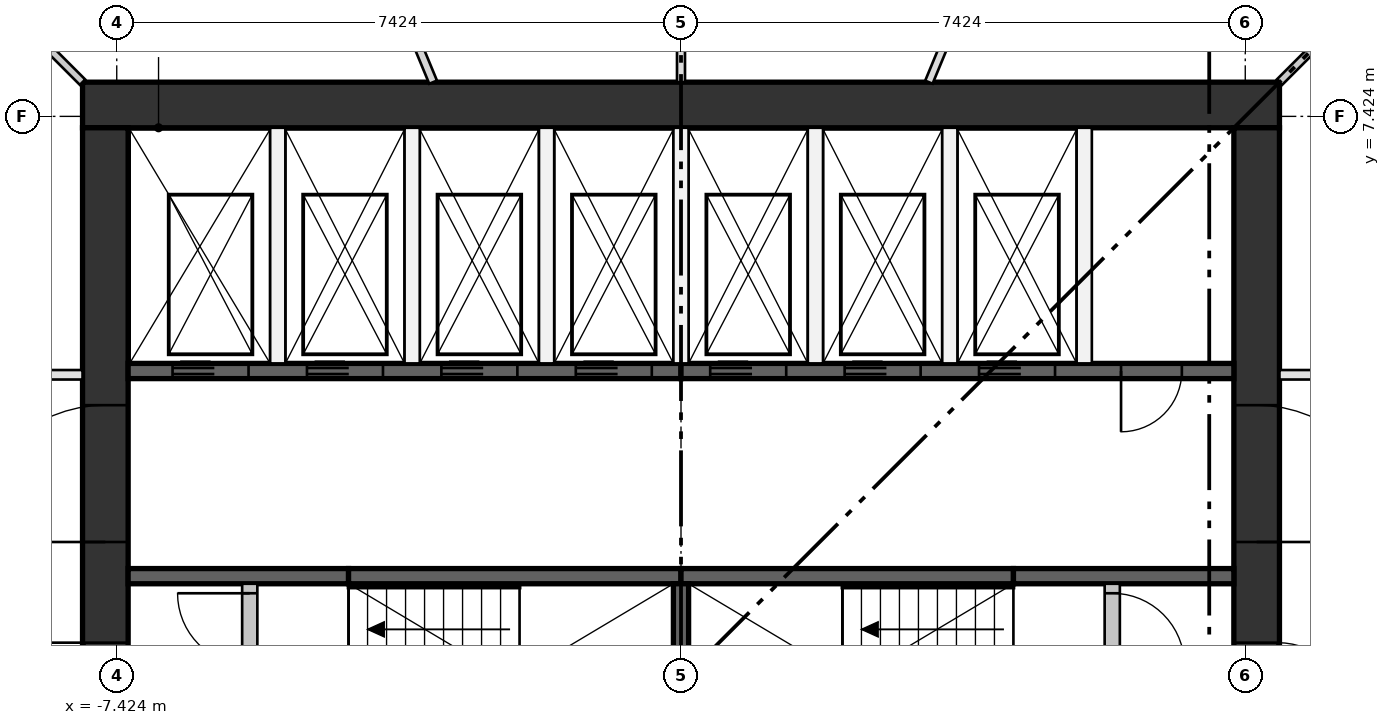
"""IFC4 building model, lengths in metres.
Left out: names, types, materials, properties, quantities, classifications, styles, units other than length and angle.
Written with IfcOpenShell. Run it as: python <this file> out.ifc"""

import sys

from ifc_helpers import new_model, si_unit, direction, frame, frame_2d, origin, place, context, subcontext, project, spatial, rectangle, extrude, element, fill, save


model = new_model("IFC4")
c1 = context("Model", 3, precision=1e-05, world=origin(), true_north=direction((0.0, 1.0)))
c2 = subcontext(c1, "Body", "Model", "MODEL_VIEW")
j1 = project(units=[si_unit("LENGTHUNIT", "METRE"), si_unit("PLANEANGLEUNIT", "RADIAN")], contexts=[c1])
p1 = place(None, origin())
s1 = spatial("IfcSite", under=j1, at=p1, CompositionType="ELEMENT")
p2 = place(p1, origin())
s2 = spatial("IfcBuilding", under=s1, at=p2, CompositionType="ELEMENT")
p3 = place(p2, frame((0.0, 0.0, 134.35)))
s3 = spatial("IfcBuildingStorey", under=s2, at=p3, CompositionType="ELEMENT", Elevation=134.35)
p4 = place(p3, frame((-7.874, 7.574, 0.0), z_axis=(0.0, 0.0, 1.0), x_axis=(1.0, 0.0, 0.0)))
e1 = element("IfcWall", 1, at=p4, inside=s3, PredefinedType="SHEAR", context=c2, shape_type="SweptSolid", body=[
    extrude(rectangle(XDim=15.748, YDim=0.6, at=frame_2d((7.874, 0.0))), origin(), (0.0, 0.0, 1.0), 3.35),
])
p5 = place(p3, frame((-7.574, -7.274, 0.0), z_axis=(0.0, 0.0, 1.0), x_axis=(0.0, 1.0, 0.0)))
e2 = element("IfcWall", 2, at=p5, inside=s3, PredefinedType="SHEAR", context=c2, shape_type="SweptSolid", body=[
    extrude(rectangle(XDim=14.548, YDim=0.6, at=frame_2d((7.274, 0.0))), origin(), (0.0, 0.0, 1.0), 3.35),
])
p6 = place(p5, frame((6.774, 0.0, 0.0)))
e3 = element("IfcOpeningElement", 3, at=p6, cuts=e2, PredefinedType="OPENING", context=c2, shape_type="SweptSolid", body=[
    extrude(rectangle(XDim=1.0, YDim=2.1, at=frame_2d((0.5, 1.05))), frame((0.0, 0.31, 0.0), z_axis=(0.0, -1.0, 0.0), x_axis=(1.0, 0.0, 0.0)), (0.0, 0.0, 1.0), 0.62),
])
p7 = place(p5, frame((3.649, 0.0, 0.0)))
e4 = element("IfcOpeningElement", 4, at=p7, cuts=e2, PredefinedType="OPENING", context=c2, shape_type="SweptSolid", body=[
    extrude(rectangle(XDim=1.8, YDim=2.1, at=frame_2d((0.9, 1.05))), frame((0.0, 0.31, 0.0), z_axis=(0.0, -1.0, 0.0), x_axis=(1.0, 0.0, 0.0)), (0.0, 0.0, 1.0), 0.62),
])
p8 = place(p5, frame((9.098, 0.0, 0.0)))
e5 = element("IfcOpeningElement", 5, at=p8, cuts=e2, PredefinedType="OPENING", context=c2, shape_type="SweptSolid", body=[
    extrude(rectangle(XDim=1.8, YDim=2.1, at=frame_2d((0.9, 1.05))), frame((0.0, 0.31, 0.0), z_axis=(0.0, -1.0, 0.0), x_axis=(1.0, 0.0, 0.0)), (0.0, 0.0, 1.0), 0.62),
])
p9 = place(p3, frame((7.574, -7.274, 0.0), z_axis=(0.0, 0.0, 1.0), x_axis=(0.0, 1.0, 0.0)))
e6 = element("IfcWall", 6, at=p9, inside=s3, PredefinedType="SHEAR", context=c2, shape_type="SweptSolid", body=[
    extrude(rectangle(XDim=14.548, YDim=0.6, at=frame_2d((7.274, 0.0))), origin(), (0.0, 0.0, 1.0), 3.35),
])
p10 = place(p9, frame((6.774, 0.0, 0.0)))
e7 = element("IfcOpeningElement", 7, at=p10, cuts=e6, PredefinedType="OPENING", context=c2, shape_type="SweptSolid", body=[
    extrude(rectangle(XDim=1.0, YDim=2.1, at=frame_2d((0.5, 1.05))), frame((0.0, 0.31, 0.0), z_axis=(0.0, -1.0, 0.0), x_axis=(1.0, 0.0, 0.0)), (0.0, 0.0, 1.0), 0.62),
])
p11 = place(p9, frame((3.649, 0.0, 0.0)))
e8 = element("IfcOpeningElement", 8, at=p11, cuts=e6, PredefinedType="OPENING", context=c2, shape_type="SweptSolid", body=[
    extrude(rectangle(XDim=1.8, YDim=2.1, at=frame_2d((0.9, 1.05))), frame((0.0, 0.31, 0.0), z_axis=(0.0, -1.0, 0.0), x_axis=(1.0, 0.0, 0.0)), (0.0, 0.0, 1.0), 0.62),
])
p12 = place(p9, frame((9.098, 0.0, 0.0)))
e9 = element("IfcOpeningElement", 9, at=p12, cuts=e6, PredefinedType="OPENING", context=c2, shape_type="SweptSolid", body=[
    extrude(rectangle(XDim=1.8, YDim=2.1, at=frame_2d((0.9, 1.05))), frame((0.0, 0.31, 0.0), z_axis=(0.0, -1.0, 0.0), x_axis=(1.0, 0.0, 0.0)), (0.0, 0.0, 1.0), 0.62),
])
p13 = place(p3, frame((-7.274, 4.074, 0.0), z_axis=(0.0, 0.0, 1.0), x_axis=(1.0, 0.0, 0.0)))
e10 = element("IfcWall", 10, at=p13, inside=s3, PredefinedType="SHEAR", context=c2, shape_type="SweptSolid", body=[
    extrude(rectangle(XDim=7.274, YDim=0.2, at=frame_2d((3.637, 0.0))), origin(), (0.0, 0.0, 1.0), 3.0),
])
p14 = place(p13, frame((0.584, 0.0, 0.0)))
e11 = element("IfcOpeningElement", 11, at=p14, cuts=e10, PredefinedType="OPENING", context=c2, shape_type="SweptSolid", body=[
    extrude(rectangle(XDim=1.0, YDim=2.1, at=frame_2d((0.5, 1.05))), frame((0.0, 0.11, 0.0), z_axis=(0.0, -1.0, 0.0), x_axis=(1.0, 0.0, 0.0)), (0.0, 0.0, 1.0), 0.22),
])
p15 = place(p13, frame((2.353, 0.0, 0.0)))
e12 = element("IfcOpeningElement", 12, at=p15, cuts=e10, PredefinedType="OPENING", context=c2, shape_type="SweptSolid", body=[
    extrude(rectangle(XDim=1.0, YDim=2.1, at=frame_2d((0.5, 1.05))), frame((0.0, 0.11, 0.0), z_axis=(0.0, -1.0, 0.0), x_axis=(1.0, 0.0, 0.0)), (0.0, 0.0, 1.0), 0.22),
])
p16 = place(p13, frame((4.121, 0.0, 0.0)))
e13 = element("IfcOpeningElement", 13, at=p16, cuts=e10, PredefinedType="OPENING", context=c2, shape_type="SweptSolid", body=[
    extrude(rectangle(XDim=1.0, YDim=2.1, at=frame_2d((0.5, 1.05))), frame((0.0, 0.11, 0.0), z_axis=(0.0, -1.0, 0.0), x_axis=(1.0, 0.0, 0.0)), (0.0, 0.0, 1.0), 0.22),
])
p17 = place(p13, frame((5.89, 0.0, 0.0)))
e14 = element("IfcOpeningElement", 14, at=p17, cuts=e10, PredefinedType="OPENING", context=c2, shape_type="SweptSolid", body=[
    extrude(rectangle(XDim=1.0, YDim=2.1, at=frame_2d((0.5, 1.05))), frame((0.0, 0.11, 0.0), z_axis=(0.0, -1.0, 0.0), x_axis=(1.0, 0.0, 0.0)), (0.0, 0.0, 1.0), 0.22),
])
p18 = place(p3, frame((0.0, 4.074, 0.0), z_axis=(0.0, 0.0, 1.0), x_axis=(1.0, 0.0, 0.0)))
e15 = element("IfcWall", 15, at=p18, inside=s3, PredefinedType="SHEAR", context=c2, shape_type="SweptSolid", body=[
    extrude(rectangle(XDim=7.274, YDim=0.2, at=frame_2d((3.637, 0.0))), origin(), (0.0, 0.0, 1.0), 3.0),
])
p19 = place(p18, frame((0.384, 0.0, 0.0)))
e16 = element("IfcOpeningElement", 16, at=p19, cuts=e15, PredefinedType="OPENING", context=c2, shape_type="SweptSolid", body=[
    extrude(rectangle(XDim=1.0, YDim=2.1, at=frame_2d((0.5, 1.05))), frame((0.0, 0.11, 0.0), z_axis=(0.0, -1.0, 0.0), x_axis=(1.0, 0.0, 0.0)), (0.0, 0.0, 1.0), 0.22),
])
p20 = place(p18, frame((2.153, 0.0, 0.0)))
e17 = element("IfcOpeningElement", 17, at=p20, cuts=e15, PredefinedType="OPENING", context=c2, shape_type="SweptSolid", body=[
    extrude(rectangle(XDim=1.0, YDim=2.1, at=frame_2d((0.5, 1.05))), frame((0.0, 0.11, 0.0), z_axis=(0.0, -1.0, 0.0), x_axis=(1.0, 0.0, 0.0)), (0.0, 0.0, 1.0), 0.22),
])
p21 = place(p18, frame((3.921, 0.0, 0.0)))
e18 = element("IfcOpeningElement", 18, at=p21, cuts=e15, PredefinedType="OPENING", context=c2, shape_type="SweptSolid", body=[
    extrude(rectangle(XDim=1.0, YDim=2.1, at=frame_2d((0.5, 1.05))), frame((0.0, 0.11, 0.0), z_axis=(0.0, -1.0, 0.0), x_axis=(1.0, 0.0, 0.0)), (0.0, 0.0, 1.0), 0.22),
])
p22 = place(p18, frame((5.79, 0.0, 0.0)))
e19 = element("IfcOpeningElement", 19, at=p22, cuts=e15, PredefinedType="OPENING", context=c2, shape_type="SweptSolid", body=[
    extrude(rectangle(XDim=0.8, YDim=2.1, at=frame_2d((0.4, 1.05))), frame((0.0, 0.11, 0.0), z_axis=(0.0, -1.0, 0.0), x_axis=(1.0, 0.0, 0.0)), (0.0, 0.0, 1.0), 0.22),
])
p23 = place(p3, frame((-7.274, 1.375, 0.0), z_axis=(0.0, 0.0, 1.0), x_axis=(1.0, 0.0, 0.0)))
e20 = element("IfcWall", 20, at=p23, inside=s3, PredefinedType="SHEAR", context=c2, shape_type="SweptSolid", body=[
    extrude(rectangle(XDim=2.9, YDim=0.2, at=frame_2d((1.45, 0.0))), origin(), (0.0, 0.0, 1.0), 3.0),
])
for number, where, z_axis, x_axis in (
    (21, (-4.374, 1.375, 0.0), (0.0, 0.0, 1.0), (1.0, 0.0, 0.0)),
    (22, (0.0, 1.375, 0.0), (0.0, 0.0, 1.0), (1.0, 0.0, 0.0)),
):
    element("IfcWall", number, at=place(p3, frame(where, z_axis=z_axis, x_axis=x_axis)), inside=s3, PredefinedType="SHEAR", context=c2, shape_type="SweptSolid", body=[
        extrude(rectangle(XDim=4.374, YDim=0.2, at=frame_2d((2.187, 0.0))), origin(), (0.0, 0.0, 1.0), 3.0),
    ])
p24 = place(p3, frame((4.374, 1.375, 0.0), z_axis=(0.0, 0.0, 1.0), x_axis=(1.0, 0.0, 0.0)))
e23 = element("IfcWall", 23, at=p24, inside=s3, PredefinedType="SHEAR", context=c2, shape_type="SweptSolid", body=[
    extrude(rectangle(XDim=2.9, YDim=0.2, at=frame_2d((1.45, 0.0))), origin(), (0.0, 0.0, 1.0), 3.0),
])
p25 = place(p3, frame((0.0, -1.275, 0.0), z_axis=(0.0, 0.0, 1.0), x_axis=(0.0, 1.0, 0.0)))
e24 = element("IfcWall", 24, at=p25, inside=s3, PredefinedType="SHEAR", context=c2, shape_type="SweptSolid", body=[
    extrude(rectangle(XDim=2.55, YDim=0.2, at=frame_2d((1.275, 0.0))), origin(), (0.0, 0.0, 1.0), 3.0),
])
for number, where, z_axis, x_axis in (
    (25, (-5.305, 4.174, 0.0), (0.0, 0.0, 1.0), (0.0, 1.0, 0.0)),
    (26, (-3.537, 4.174, 0.0), (0.0, 0.0, 1.0), (0.0, 1.0, 0.0)),
    (27, (-1.769, 4.174, 0.0), (0.0, 0.0, 1.0), (0.0, 1.0, 0.0)),
    (28, (0.0, 4.174, 0.0), (0.0, 0.0, 1.0), (0.0, 1.0, 0.0)),
    (29, (1.769, 4.174, 0.0), (0.0, 0.0, 1.0), (0.0, 1.0, 0.0)),
    (30, (3.537, 4.174, 0.0), (0.0, 0.0, 1.0), (0.0, 1.0, 0.0)),
    (31, (5.305, 4.174, 0.0), (0.0, 0.0, 1.0), (0.0, 1.0, 0.0)),
):
    element("IfcWall", number, at=place(p3, frame(where, z_axis=z_axis, x_axis=x_axis)), inside=s3, PredefinedType="PARTITIONING", context=c2, shape_type="SweptSolid", body=[
        extrude(rectangle(XDim=3.1, YDim=0.2, at=frame_2d((1.55, 0.0))), origin(), (0.0, 0.0, 1.0), 3.0),
    ])
p26 = place(p3, frame((-5.674, -1.275, 0.0), z_axis=(0.0, 0.0, 1.0), x_axis=(0.0, 1.0, 0.0)))
e32 = element("IfcWall", 32, at=p26, inside=s3, PredefinedType="PARTITIONING", context=c2, shape_type="SweptSolid", body=[
    extrude(rectangle(XDim=2.55, YDim=0.2, at=frame_2d((1.275, 0.0))), origin(), (0.0, 0.0, 1.0), 3.0),
])
p27 = place(p26, frame((0.125, 0.0, 0.0)))
e33 = element("IfcOpeningElement", 33, at=p27, cuts=e32, PredefinedType="OPENING", context=c2, shape_type="SweptSolid", body=[
    extrude(rectangle(XDim=0.95, YDim=2.1, at=frame_2d((0.475, 1.05))), frame((0.0, 0.11, 0.0), z_axis=(0.0, -1.0, 0.0), x_axis=(1.0, 0.0, 0.0)), (0.0, 0.0, 1.0), 0.22),
])
p28 = place(p26, frame((1.475, 0.0, 0.0)))
e34 = element("IfcOpeningElement", 34, at=p28, cuts=e32, PredefinedType="OPENING", context=c2, shape_type="SweptSolid", body=[
    extrude(rectangle(XDim=0.95, YDim=2.1, at=frame_2d((0.475, 1.05))), frame((0.0, 0.11, 0.0), z_axis=(0.0, -1.0, 0.0), x_axis=(1.0, 0.0, 0.0)), (0.0, 0.0, 1.0), 0.22),
])
p29 = place(p3, frame((5.674, -1.275, 0.0), z_axis=(0.0, 0.0, 1.0), x_axis=(0.0, 1.0, 0.0)))
e35 = element("IfcWall", 35, at=p29, inside=s3, PredefinedType="PARTITIONING", context=c2, shape_type="SweptSolid", body=[
    extrude(rectangle(XDim=2.55, YDim=0.2, at=frame_2d((1.275, 0.0))), origin(), (0.0, 0.0, 1.0), 3.0),
])
p30 = place(p29, frame((0.125, 0.0, 0.0)))
e36 = element("IfcOpeningElement", 36, at=p30, cuts=e35, PredefinedType="OPENING", context=c2, shape_type="SweptSolid", body=[
    extrude(rectangle(XDim=0.95, YDim=2.1, at=frame_2d((0.475, 1.05))), frame((0.0, 0.11, 0.0), z_axis=(0.0, -1.0, 0.0), x_axis=(1.0, 0.0, 0.0)), (0.0, 0.0, 1.0), 0.22),
])
p31 = place(p29, frame((1.475, 0.0, 0.0)))
e37 = element("IfcOpeningElement", 37, at=p31, cuts=e35, PredefinedType="OPENING", context=c2, shape_type="SweptSolid", body=[
    extrude(rectangle(XDim=0.95, YDim=2.1, at=frame_2d((0.475, 1.05))), frame((0.0, 0.11, 0.0), z_axis=(0.0, -1.0, 0.0), x_axis=(1.0, 0.0, 0.0)), (0.0, 0.0, 1.0), 0.22),
])
p32 = place(p3, frame((7.874, 4.024, 0.0), z_axis=(0.0, 0.0, 1.0), x_axis=(1.0, 0.0, 0.0)))
e38 = element("IfcWall", 38, at=p32, inside=s3, PredefinedType="PARTITIONING", context=c2, shape_type="SweptSolid", body=[
    extrude(rectangle(XDim=4.983, YDim=0.125, at=frame_2d((2.491, 0.0))), origin(), (0.0, 0.0, 1.0), 3.0),
])
p33 = place(p32, frame((2.0, 0.0, 0.0)))
e39 = element("IfcOpeningElement", 39, at=p33, cuts=e38, PredefinedType="OPENING", context=c2, shape_type="SweptSolid", body=[
    extrude(rectangle(XDim=1.0, YDim=2.1, at=frame_2d((0.5, 1.05))), frame((0.0, 0.073, 0.0), z_axis=(0.0, -1.0, 0.0), x_axis=(1.0, 0.0, 0.0)), (0.0, 0.0, 1.0), 0.145),
])
p34 = place(p3, frame((-14.332, 4.024, 0.0), z_axis=(0.0, 0.0, 1.0), x_axis=(1.0, 0.0, 0.0)))
e40 = element("IfcWall", 40, at=p34, inside=s3, PredefinedType="PARTITIONING", context=c2, shape_type="SweptSolid", body=[
    extrude(rectangle(XDim=6.458, YDim=0.125, at=frame_2d((3.229, 0.0))), origin(), (0.0, 0.0, 1.0), 3.0),
])
p35 = place(p34, frame((2.7, 0.0, 0.0)))
e41 = element("IfcOpeningElement", 41, at=p35, cuts=e40, PredefinedType="OPENING", context=c2, shape_type="SweptSolid", body=[
    extrude(rectangle(XDim=1.0, YDim=2.1, at=frame_2d((0.5, 1.05))), frame((0.0, 0.073, 0.0), z_axis=(0.0, -1.0, 0.0), x_axis=(1.0, 0.0, 0.0)), (0.0, 0.0, 1.0), 0.145),
])
p36 = place(p3, frame((7.874, 7.874, 0.0), z_axis=(0.0, 0.0, 1.0), x_axis=(0.707106781187, 0.707106781187, 0.0)))
e42 = element("IfcWall", 42, at=p36, inside=s3, PredefinedType="PARTITIONING", context=c2, shape_type="SweptSolid", body=[
    extrude(rectangle(XDim=6.714, YDim=0.1, at=frame_2d((3.357, 0.0))), origin(), (0.0, 0.0, 1.0), 3.0),
])
p37 = place(p36, frame((2.7, 0.0, 0.0)))
e43 = element("IfcOpeningElement", 43, at=p37, cuts=e42, PredefinedType="OPENING", context=c2, shape_type="SweptSolid", body=[
    extrude(rectangle(XDim=1.0, YDim=2.1, at=frame_2d((0.5, 1.05))), frame((0.0, 0.06, 0.0), z_axis=(0.0, -1.0, 0.0), x_axis=(1.0, 0.0, 0.0)), (0.0, 0.0, 1.0), 0.12),
])
p38 = place(p3, frame((3.261, 7.874, 0.0), z_axis=(0.0, 0.0, 1.0), x_axis=(0.38268632394, 0.923878334777, 0.0)))
e44 = element("IfcWall", 44, at=p38, inside=s3, PredefinedType="PARTITIONING", context=c2, shape_type="SweptSolid", body=[
    extrude(rectangle(XDim=5.457, YDim=0.105, at=frame_2d((2.729, 0.0))), origin(), (0.0, 0.0, 1.0), 3.0),
])
p39 = place(p38, frame((2.2, 0.0, 0.0)))
e45 = element("IfcOpeningElement", 45, at=p39, cuts=e44, PredefinedType="OPENING", context=c2, shape_type="SweptSolid", body=[
    extrude(rectangle(XDim=1.0, YDim=2.1, at=frame_2d((0.5, 1.05))), frame((0.0, 0.062, 0.0), z_axis=(0.0, -1.0, 0.0), x_axis=(1.0, 0.0, 0.0)), (0.0, 0.0, 1.0), 0.125),
])
p40 = place(p3, frame((0.0, 7.874, 0.0), z_axis=(0.0, 0.0, 1.0), x_axis=(0.0, 1.0, 0.0)))
e46 = element("IfcWall", 46, at=p40, inside=s3, PredefinedType="PARTITIONING", context=c2, shape_type="SweptSolid", body=[
    extrude(rectangle(XDim=6.106, YDim=0.105, at=frame_2d((3.053, 0.0))), origin(), (0.0, 0.0, 1.0), 3.0),
])
p41 = place(p3, frame((-3.261, 7.874, 0.0), z_axis=(0.0, 0.0, 1.0), x_axis=(-0.38268632394, 0.923878334777, 0.0)))
e47 = element("IfcWall", 47, at=p41, inside=s3, PredefinedType="PARTITIONING", context=c2, shape_type="SweptSolid", body=[
    extrude(rectangle(XDim=5.457, YDim=0.11, at=frame_2d((2.729, 0.0))), origin(), (0.0, 0.0, 1.0), 3.0),
])
p42 = place(p3, frame((-12.622, 12.622, 0.0), z_axis=(0.0, 0.0, 1.0), x_axis=(0.707106781187, -0.707106781187, 0.0)))
e48 = element("IfcWall", 48, at=p42, inside=s3, PredefinedType="PARTITIONING", context=c2, shape_type="SweptSolid", body=[
    extrude(rectangle(XDim=6.714, YDim=0.1, at=frame_2d((3.357, 0.0))), origin(), (0.0, 0.0, 1.0), 3.0),
])
p43 = place(p42, frame((3.0, 0.0, 0.0)))
e49 = element("IfcOpeningElement", 49, at=p43, cuts=e48, PredefinedType="OPENING", context=c2, shape_type="SweptSolid", body=[
    extrude(rectangle(XDim=1.0, YDim=2.1, at=frame_2d((0.5, 1.05))), frame((0.0, 0.06, 0.0), z_axis=(0.0, -1.0, 0.0), x_axis=(1.0, 0.0, 0.0)), (0.0, 0.0, 1.0), 0.12),
])
p44 = place(p14, frame((1.0, 0.0, 0.0), z_axis=(0.0, 0.0, 1.0), x_axis=(-1.0, 0.0, 0.0)))
e50 = element("IfcDoor", 50, at=p44, inside=s3, OperationType="DOUBLE_DOOR_SLIDING", PredefinedType="DOOR", context=c2, shape_type="SweptSolid", body=[
    extrude(rectangle(XDim=1.0, YDim=2.1, at=frame_2d((0.5, 1.05))), frame((0.0, 0.025, 0.0), z_axis=(0.0, -1.0, 0.0), x_axis=(1.0, 0.0, 0.0)), (0.0, 0.0, 1.0), 0.05),
])
fill(e11, e50)
p45 = place(p15, frame((1.0, 0.0, 0.0), z_axis=(0.0, 0.0, 1.0), x_axis=(-1.0, 0.0, 0.0)))
e51 = element("IfcDoor", 51, at=p45, inside=s3, OperationType="DOUBLE_DOOR_SLIDING", PredefinedType="DOOR", context=c2, shape_type="SweptSolid", body=[
    extrude(rectangle(XDim=1.0, YDim=2.1, at=frame_2d((0.5, 1.05))), frame((0.0, 0.025, 0.0), z_axis=(0.0, -1.0, 0.0), x_axis=(1.0, 0.0, 0.0)), (0.0, 0.0, 1.0), 0.05),
])
fill(e12, e51)
p46 = place(p16, frame((1.0, 0.0, 0.0), z_axis=(0.0, 0.0, 1.0), x_axis=(-1.0, 0.0, 0.0)))
e52 = element("IfcDoor", 52, at=p46, inside=s3, OperationType="DOUBLE_DOOR_SLIDING", PredefinedType="DOOR", context=c2, shape_type="SweptSolid", body=[
    extrude(rectangle(XDim=1.0, YDim=2.1, at=frame_2d((0.5, 1.05))), frame((0.0, 0.025, 0.0), z_axis=(0.0, -1.0, 0.0), x_axis=(1.0, 0.0, 0.0)), (0.0, 0.0, 1.0), 0.05),
])
fill(e13, e52)
p47 = place(p17, frame((1.0, 0.0, 0.0), z_axis=(0.0, 0.0, 1.0), x_axis=(-1.0, 0.0, 0.0)))
e53 = element("IfcDoor", 53, at=p47, inside=s3, OperationType="DOUBLE_DOOR_SLIDING", PredefinedType="DOOR", context=c2, shape_type="SweptSolid", body=[
    extrude(rectangle(XDim=1.0, YDim=2.1, at=frame_2d((0.5, 1.05))), frame((0.0, 0.025, 0.0), z_axis=(0.0, -1.0, 0.0), x_axis=(1.0, 0.0, 0.0)), (0.0, 0.0, 1.0), 0.05),
])
fill(e14, e53)
p48 = place(p19, frame((1.0, 0.0, 0.0), z_axis=(0.0, 0.0, 1.0), x_axis=(-1.0, 0.0, 0.0)))
e54 = element("IfcDoor", 54, at=p48, inside=s3, OperationType="DOUBLE_DOOR_SLIDING", PredefinedType="DOOR", context=c2, shape_type="SweptSolid", body=[
    extrude(rectangle(XDim=1.0, YDim=2.1, at=frame_2d((0.5, 1.05))), frame((0.0, 0.025, 0.0), z_axis=(0.0, -1.0, 0.0), x_axis=(1.0, 0.0, 0.0)), (0.0, 0.0, 1.0), 0.05),
])
fill(e16, e54)
p49 = place(p20, frame((1.0, 0.0, 0.0), z_axis=(0.0, 0.0, 1.0), x_axis=(-1.0, 0.0, 0.0)))
e55 = element("IfcDoor", 55, at=p49, inside=s3, OperationType="DOUBLE_DOOR_SLIDING", PredefinedType="DOOR", context=c2, shape_type="SweptSolid", body=[
    extrude(rectangle(XDim=1.0, YDim=2.1, at=frame_2d((0.5, 1.05))), frame((0.0, 0.025, 0.0), z_axis=(0.0, -1.0, 0.0), x_axis=(1.0, 0.0, 0.0)), (0.0, 0.0, 1.0), 0.05),
])
fill(e17, e55)
p50 = place(p21, frame((1.0, 0.0, 0.0), z_axis=(0.0, 0.0, 1.0), x_axis=(-1.0, 0.0, 0.0)))
e56 = element("IfcDoor", 56, at=p50, inside=s3, OperationType="DOUBLE_DOOR_SLIDING", PredefinedType="DOOR", context=c2, shape_type="SweptSolid", body=[
    extrude(rectangle(XDim=1.0, YDim=2.1, at=frame_2d((0.5, 1.05))), frame((0.0, 0.025, 0.0), z_axis=(0.0, -1.0, 0.0), x_axis=(1.0, 0.0, 0.0)), (0.0, 0.0, 1.0), 0.05),
])
fill(e18, e56)
p51 = place(p28, origin())
e57 = element("IfcDoor", 57, at=p51, inside=s3, OperationType="SINGLE_SWING_RIGHT", PredefinedType="DOOR", context=c2, shape_type="SweptSolid", body=[
    extrude(rectangle(XDim=0.95, YDim=2.1, at=frame_2d((0.475, 1.05))), frame((0.0, 0.025, 0.0), z_axis=(0.0, -1.0, 0.0), x_axis=(1.0, 0.0, 0.0)), (0.0, 0.0, 1.0), 0.05),
])
fill(e34, e57)
p52 = place(p31, frame((0.95, 0.0, 0.0), z_axis=(0.0, 0.0, 1.0), x_axis=(-1.0, 0.0, 0.0)))
e58 = element("IfcDoor", 58, at=p52, inside=s3, OperationType="SINGLE_SWING_LEFT", PredefinedType="DOOR", context=c2, shape_type="SweptSolid", body=[
    extrude(rectangle(XDim=0.95, YDim=2.1, at=frame_2d((0.475, 1.05))), frame((0.0, 0.025, 0.0), z_axis=(0.0, -1.0, 0.0), x_axis=(1.0, 0.0, 0.0)), (0.0, 0.0, 1.0), 0.05),
])
fill(e37, e58)
p53 = place(p22, frame((0.8, 0.0, 0.0), z_axis=(0.0, 0.0, 1.0), x_axis=(-1.0, 0.0, 0.0)))
e59 = element("IfcDoor", 59, at=p53, inside=s3, OperationType="SINGLE_SWING_LEFT", PredefinedType="DOOR", context=c2, shape_type="SweptSolid", body=[
    extrude(rectangle(XDim=0.8, YDim=2.1, at=frame_2d((0.4, 1.05))), frame((0.0, 0.025, 0.0), z_axis=(0.0, -1.0, 0.0), x_axis=(1.0, 0.0, 0.0)), (0.0, 0.0, 1.0), 0.05),
])
fill(e19, e59)
p54 = place(p6, origin())
e60 = element("IfcDoor", 60, at=p54, inside=s3, OperationType="SINGLE_SWING_RIGHT", PredefinedType="DOOR", context=c2, shape_type="SweptSolid", body=[
    extrude(rectangle(XDim=1.0, YDim=2.1, at=frame_2d((0.5, 1.05))), frame((0.0, 0.3, 0.0), z_axis=(0.0, -1.0, 0.0), x_axis=(1.0, 0.0, 0.0)), (0.0, 0.0, 1.0), 0.05),
])
fill(e3, e60)
p55 = place(p8, origin())
e61 = element("IfcDoor", 61, at=p55, inside=s3, OperationType="DOUBLE_DOOR_SINGLE_SWING", PredefinedType="DOOR", context=c2, shape_type="SweptSolid", body=[
    extrude(rectangle(XDim=1.8, YDim=2.1, at=frame_2d((0.9, 1.05))), frame((0.0, 0.025, 0.0), z_axis=(0.0, -1.0, 0.0), x_axis=(1.0, 0.0, 0.0)), (0.0, 0.0, 1.0), 0.05),
])
fill(e5, e61)
p56 = place(p10, frame((1.0, 0.0, 0.0), z_axis=(0.0, 0.0, 1.0), x_axis=(-1.0, 0.0, 0.0)))
e62 = element("IfcDoor", 62, at=p56, inside=s3, OperationType="SINGLE_SWING_LEFT", PredefinedType="DOOR", context=c2, shape_type="SweptSolid", body=[
    extrude(rectangle(XDim=1.0, YDim=2.1, at=frame_2d((0.5, 1.05))), frame((0.0, 0.3, 0.0), z_axis=(0.0, -1.0, 0.0), x_axis=(1.0, 0.0, 0.0)), (0.0, 0.0, 1.0), 0.05),
])
fill(e7, e62)
p57 = place(p12, frame((1.8, 0.0, 0.0), z_axis=(0.0, 0.0, 1.0), x_axis=(-1.0, 0.0, 0.0)))
e63 = element("IfcDoor", 63, at=p57, inside=s3, OperationType="DOUBLE_DOOR_SINGLE_SWING", PredefinedType="DOOR", context=c2, shape_type="SweptSolid", body=[
    extrude(rectangle(XDim=1.8, YDim=2.1, at=frame_2d((0.9, 1.05))), frame((0.0, 0.025, 0.0), z_axis=(0.0, -1.0, 0.0), x_axis=(1.0, 0.0, 0.0)), (0.0, 0.0, 1.0), 0.05),
])
fill(e9, e63)
save(model, sys.argv[1])
